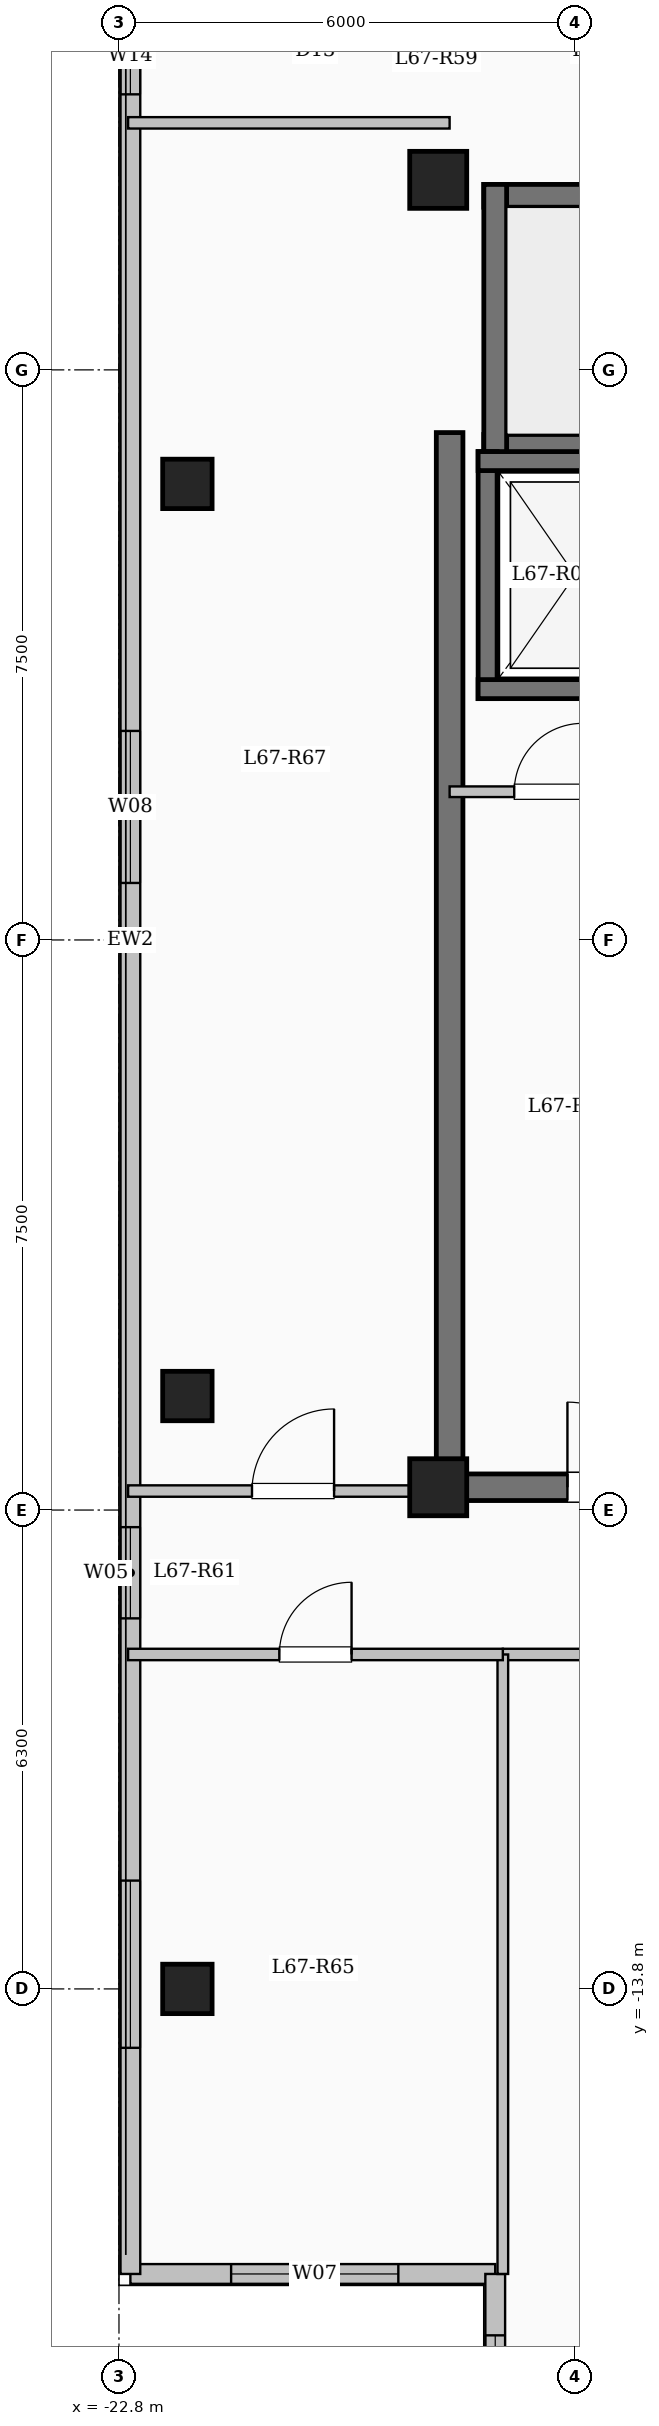
"""IFC4 building model, lengths in metres.
Left out: names, types, materials, properties, quantities, classifications, styles, units other than length and angle.
Written with IfcOpenShell. Run it as: python <this file> out.ifc"""

import sys

from ifc_helpers import new_model, si_unit, direction, frame, frame_2d, origin, origin_2d, place, context, subcontext, project, spatial, rectangle, extrude, element, fill, save


model = new_model("IFC4")
c1 = context("Model", 3, precision=1e-05, world=origin(), true_north=direction((0.0, 1.0)))
c2 = subcontext(c1, "Body", "Model", "MODEL_VIEW")
j1 = project(units=[si_unit("LENGTHUNIT", "METRE"), si_unit("PLANEANGLEUNIT", "RADIAN")], contexts=[c1])
p1 = place(None, origin())
s1 = spatial("IfcSite", under=j1, at=p1, CompositionType="ELEMENT")
p2 = place(p1, origin())
s2 = spatial("IfcBuilding", under=s1, at=p2, CompositionType="ELEMENT")
p3 = place(p2, frame((0.0, 0.0, 248.2)))
s3 = spatial("IfcBuildingStorey", under=s2, at=p3, CompositionType="ELEMENT", Elevation=248.2)
for number, where, z_axis, x_axis in (
    (1, (-18.6, -7.2, 0.0), (0.0, 0.0, 1.0), (1.0, 0.0, 0.0)),
    (2, (-18.6, 10.0, 0.0), (0.0, 0.0, 1.0), (1.0, 0.0, 0.0)),
):
    element("IfcColumn", number, at=place(p3, frame(where, z_axis=z_axis, x_axis=x_axis)), inside=s3, PredefinedType="COLUMN", context=c2, shape_type="SweptSolid", body=[
        extrude(rectangle(XDim=0.75, YDim=0.75, at=origin_2d()), origin(), (0.0, 0.0, 1.0), 3.35),
    ])
for number, where, z_axis, x_axis in (
    (3, (-21.9, -13.8, 0.0), (0.0, 0.0, 1.0), (1.0, 0.0, 0.0)),
    (4, (-21.9, -6.0, 0.0), (0.0, 0.0, 1.0), (1.0, 0.0, 0.0)),
    (5, (-21.9, 6.0, 0.0), (0.0, 0.0, 1.0), (1.0, 0.0, 0.0)),
):
    element("IfcColumn", number, at=place(p3, frame(where, z_axis=z_axis, x_axis=x_axis)), inside=s3, PredefinedType="COLUMN", context=c2, shape_type="SweptSolid", body=[
        extrude(rectangle(XDim=0.65, YDim=0.65, at=origin_2d()), origin(), (0.0, 0.0, 1.0), 3.35),
    ])
p4 = place(p3, frame((-17.85, -17.55, 0.0), z_axis=(0.0, 0.0, 1.0), x_axis=(-1.0, 0.0, 0.0)))
e6 = element("IfcWall", 6, at=p4, inside=s3, PredefinedType="SOLIDWALL", context=c2, shape_type="SweptSolid", body=[
    extrude(rectangle(XDim=4.8, YDim=0.26, at=frame_2d((2.4, 0.0))), origin(), (0.0, 0.0, 1.0), 3.1),
])
p5 = place(p4, frame((1.275, 0.0, 0.9)))
e7 = element("IfcOpeningElement", 7, at=p5, cuts=e6, PredefinedType="OPENING", context=c2, shape_type="SweptSolid", body=[
    extrude(rectangle(XDim=2.2, YDim=1.75, at=frame_2d((1.1, 0.875))), frame((0.0, 0.14, 0.0), z_axis=(0.0, -1.0, 0.0), x_axis=(1.0, 0.0, 0.0)), (0.0, 0.0, 1.0), 0.28),
])
p6 = place(p3, frame((-22.65, -17.55, 0.0), z_axis=(0.0, 0.0, 1.0), x_axis=(0.0, 1.0, 0.0)))
e8 = element("IfcWall", 8, at=p6, inside=s3, PredefinedType="SOLIDWALL", context=c2, shape_type="SweptSolid", body=[
    extrude(rectangle(XDim=35.1, YDim=0.26, at=frame_2d((17.55, 0.0))), origin(), (0.0, 0.0, 1.0), 3.1),
])
p7 = place(p6, frame((2.975, 0.0, 0.9)))
e9 = element("IfcOpeningElement", 9, at=p7, cuts=e8, PredefinedType="OPENING", context=c2, shape_type="SweptSolid", body=[
    extrude(rectangle(XDim=2.2, YDim=1.75, at=frame_2d((1.1, 0.875))), frame((0.0, 0.14, 0.0), z_axis=(0.0, -1.0, 0.0), x_axis=(1.0, 0.0, 0.0)), (0.0, 0.0, 1.0), 0.28),
])
p8 = place(p6, frame((8.625, 0.0, 0.95)))
e10 = element("IfcOpeningElement", 10, at=p8, cuts=e8, PredefinedType="OPENING", context=c2, shape_type="SweptSolid", body=[
    extrude(rectangle(XDim=1.2, YDim=1.5, at=frame_2d((0.6, 0.75))), frame((0.0, 0.14, 0.0), z_axis=(0.0, -1.0, 0.0), x_axis=(1.0, 0.0, 0.0)), (0.0, 0.0, 1.0), 0.28),
])
p9 = place(p6, frame((18.3, 0.0, 0.9)))
e11 = element("IfcOpeningElement", 11, at=p9, cuts=e8, PredefinedType="OPENING", context=c2, shape_type="SweptSolid", body=[
    extrude(rectangle(XDim=2.0, YDim=1.7, at=frame_2d((1.0, 0.85))), frame((0.0, 0.14, 0.0), z_axis=(0.0, -1.0, 0.0), x_axis=(1.0, 0.0, 0.0)), (0.0, 0.0, 1.0), 0.28),
])
p10 = place(p6, frame((28.675, 0.0, 0.95)))
e12 = element("IfcOpeningElement", 12, at=p10, cuts=e8, PredefinedType="OPENING", context=c2, shape_type="SweptSolid", body=[
    extrude(rectangle(XDim=1.0, YDim=1.5, at=frame_2d((0.5, 0.75))), frame((0.0, 0.14, 0.0), z_axis=(0.0, -1.0, 0.0), x_axis=(1.0, 0.0, 0.0)), (0.0, 0.0, 1.0), 0.28),
])
p11 = place(p6, frame((31.6, 0.0, 0.9)))
e13 = element("IfcOpeningElement", 13, at=p11, cuts=e8, PredefinedType="OPENING", context=c2, shape_type="SweptSolid", body=[
    extrude(rectangle(XDim=2.0, YDim=1.7, at=frame_2d((1.0, 0.85))), frame((0.0, 0.14, 0.0), z_axis=(0.0, -1.0, 0.0), x_axis=(1.0, 0.0, 0.0)), (0.0, 0.0, 1.0), 0.28),
])
p12 = place(p3, frame((-17.85, -20.85, 0.0), z_axis=(0.0, 0.0, 1.0), x_axis=(0.0, 1.0, 0.0)))
e14 = element("IfcWall", 14, at=p12, inside=s3, PredefinedType="SOLIDWALL", context=c2, shape_type="SweptSolid", body=[
    extrude(rectangle(XDim=3.3, YDim=0.26, at=frame_2d((1.65, 0.0))), origin(), (0.0, 0.0, 1.0), 3.1),
])
p13 = place(p12, frame((0.843, 0.0, 0.9)))
e15 = element("IfcOpeningElement", 15, at=p13, cuts=e14, PredefinedType="OPENING", context=c2, shape_type="SweptSolid", body=[
    extrude(rectangle(XDim=1.65, YDim=1.6, at=frame_2d((0.825, 0.8))), frame((0.0, 0.14, 0.0), z_axis=(0.0, -1.0, 0.0), x_axis=(1.0, 0.0, 0.0)), (0.0, 0.0, 1.0), 0.28),
])
p14 = place(p3, frame((-18.0, 9.79, 0.0), z_axis=(0.0, 0.0, 1.0), x_axis=(1.0, 0.0, 0.0)))
e16 = element("IfcWall", 16, at=p14, inside=s3, PredefinedType="SHEAR", context=c2, shape_type="SweptSolid", body=[
    extrude(rectangle(XDim=8.0, YDim=0.3, at=frame_2d((4.0, 0.0))), origin(), (0.0, 0.0, 1.0), 3.35),
])
p15 = place(p3, frame((-18.0, 6.5, 0.0), z_axis=(0.0, 0.0, 1.0), x_axis=(1.0, 0.0, 0.0)))
e17 = element("IfcWall", 17, at=p15, inside=s3, PredefinedType="SHEAR", context=c2, shape_type="SweptSolid", body=[
    extrude(rectangle(XDim=8.0, YDim=0.3, at=frame_2d((4.0, 0.0))), origin(), (0.0, 0.0, 1.0), 3.35),
])
p16 = place(p15, frame((6.45, 0.0, 0.0)))
e18 = element("IfcOpeningElement", 18, at=p16, cuts=e17, PredefinedType="OPENING", context=c2, shape_type="SweptSolid", body=[
    extrude(rectangle(XDim=1.0, YDim=2.15, at=frame_2d((0.5, 1.075))), frame((0.0, 0.16, 0.0), z_axis=(0.0, -1.0, 0.0), x_axis=(1.0, 0.0, 0.0)), (0.0, 0.0, 1.0), 0.32),
])
p17 = place(p3, frame((-17.85, 6.35, 0.0), z_axis=(0.0, 0.0, 1.0), x_axis=(0.0, 1.0, 0.0)))
e19 = element("IfcWall", 19, at=p17, inside=s3, PredefinedType="SHEAR", context=c2, shape_type="SweptSolid", body=[
    extrude(rectangle(XDim=3.59, YDim=0.3, at=frame_2d((1.795, 0.0))), origin(), (0.0, 0.0, 1.0), 3.35),
])
p18 = place(p3, frame((-17.95, 3.175, 0.0), z_axis=(0.0, 0.0, 1.0), x_axis=(0.0, 1.0, 0.0)))
e20 = element("IfcWall", 20, at=p18, inside=s3, PredefinedType="SHEAR", context=c2, shape_type="SweptSolid", body=[
    extrude(rectangle(XDim=3.25, YDim=0.25, at=frame_2d((1.625, 0.0))), origin(), (0.0, 0.0, 1.0), 3.35),
])
for number, where, z_axis, x_axis in (
    (21, (-18.075, 3.3, 0.0), (0.0, 0.0, 1.0), (1.0, 0.0, 0.0)),
    (22, (-18.075, 6.3, 0.0), (0.0, 0.0, 1.0), (1.0, 0.0, 0.0)),
):
    element("IfcWall", number, at=place(p3, frame(where, z_axis=z_axis, x_axis=x_axis)), inside=s3, PredefinedType="SHEAR", context=c2, shape_type="SweptSolid", body=[
        extrude(rectangle(XDim=2.55, YDim=0.25, at=frame_2d((1.275, 0.0))), origin(), (0.0, 0.0, 1.0), 3.35),
    ])
p19 = place(p3, frame((-18.45, -7.375, 0.0), z_axis=(0.0, 0.0, 1.0), x_axis=(0.0, 1.0, 0.0)))
e23 = element("IfcWall", 23, at=p19, inside=s3, PredefinedType="SHEAR", context=c2, shape_type="SweptSolid", body=[
    extrude(rectangle(XDim=14.05, YDim=0.35, at=frame_2d((7.025, 0.0))), origin(), (0.0, 0.0, 1.0), 3.35),
])
p20 = place(p3, frame((-18.625, -7.2, 0.0), z_axis=(0.0, 0.0, 1.0), x_axis=(1.0, 0.0, 0.0)))
e24 = element("IfcWall", 24, at=p20, inside=s3, PredefinedType="SHEAR", context=c2, shape_type="SweptSolid", body=[
    extrude(rectangle(XDim=8.55, YDim=0.35, at=frame_2d((4.275, 0.0))), origin(), (0.0, 0.0, 1.0), 3.35),
])
p21 = place(p20, frame((1.725, 0.0, 0.0)))
e25 = element("IfcOpeningElement", 25, at=p21, cuts=e24, PredefinedType="OPENING", context=c2, shape_type="SweptSolid", body=[
    extrude(rectangle(XDim=1.12, YDim=2.15, at=frame_2d((0.56, 1.075))), frame((0.0, 0.185, 0.0), z_axis=(0.0, -1.0, 0.0), x_axis=(1.0, 0.0, 0.0)), (0.0, 0.0, 1.0), 0.37),
])
p22 = place(p3, frame((-18.45, 1.95, 0.0), z_axis=(0.0, 0.0, 1.0), x_axis=(1.0, 0.0, 0.0)))
e26 = element("IfcWall", 26, at=p22, inside=s3, PredefinedType="PARTITIONING", context=c2, shape_type="SweptSolid", body=[
    extrude(rectangle(XDim=3.15, YDim=0.14, at=frame_2d((1.575, 0.0))), origin(), (0.0, 0.0, 1.0), 3.1),
])
p23 = place(p22, frame((0.85, 0.0, 0.0)))
e27 = element("IfcOpeningElement", 27, at=p23, cuts=e26, PredefinedType="OPENING", context=c2, shape_type="SweptSolid", body=[
    extrude(rectangle(XDim=0.9, YDim=2.08, at=frame_2d((0.45, 1.04))), frame((0.0, 0.08, 0.0), z_axis=(0.0, -1.0, 0.0), x_axis=(1.0, 0.0, 0.0)), (0.0, 0.0, 1.0), 0.16),
])
p24 = place(p3, frame((-17.75, -9.4, 0.0), z_axis=(0.0, 0.0, 1.0), x_axis=(1.0, 0.0, 0.0)))
e28 = element("IfcWall", 28, at=p24, inside=s3, PredefinedType="PARTITIONING", context=c2, shape_type="SweptSolid", body=[
    extrude(rectangle(XDim=9.2, YDim=0.15, at=frame_2d((4.6, 0.0))), origin(), (0.0, 0.0, 1.0), 3.1),
])
p25 = place(p24, frame((1.142, 0.0, 0.0)))
e29 = element("IfcOpeningElement", 29, at=p25, cuts=e28, PredefinedType="OPENING", context=c2, shape_type="SweptSolid", body=[
    extrude(rectangle(XDim=0.95, YDim=2.15, at=frame_2d((0.475, 1.075))), frame((0.0, 0.085, 0.0), z_axis=(0.0, -1.0, 0.0), x_axis=(1.0, 0.0, 0.0)), (0.0, 0.0, 1.0), 0.17),
])
p26 = place(p24, frame((4.466, 0.0, 0.0)))
e30 = element("IfcOpeningElement", 30, at=p26, cuts=e28, PredefinedType="OPENING", context=c2, shape_type="SweptSolid", body=[
    extrude(rectangle(XDim=0.95, YDim=2.15, at=frame_2d((0.475, 1.075))), frame((0.0, 0.085, 0.0), z_axis=(0.0, -1.0, 0.0), x_axis=(1.0, 0.0, 0.0)), (0.0, 0.0, 1.0), 0.17),
])
p27 = place(p24, frame((7.424, 0.0, 0.0)))
e31 = element("IfcOpeningElement", 31, at=p27, cuts=e28, PredefinedType="OPENING", context=c2, shape_type="SweptSolid", body=[
    extrude(rectangle(XDim=0.95, YDim=2.15, at=frame_2d((0.475, 1.075))), frame((0.0, 0.085, 0.0), z_axis=(0.0, -1.0, 0.0), x_axis=(1.0, 0.0, 0.0)), (0.0, 0.0, 1.0), 0.17),
])
p28 = place(p3, frame((-22.68, -7.25, 0.0), z_axis=(0.0, 0.0, 1.0), x_axis=(1.0, 0.0, 0.0)))
e32 = element("IfcWall", 32, at=p28, inside=s3, PredefinedType="PARTITIONING", context=c2, shape_type="SweptSolid", body=[
    extrude(rectangle(XDim=4.23, YDim=0.15, at=frame_2d((2.115, 0.0))), origin(), (0.0, 0.0, 1.0), 3.1),
])
p29 = place(p28, frame((1.63, 0.0, 0.0)))
e33 = element("IfcOpeningElement", 33, at=p29, cuts=e32, PredefinedType="OPENING", context=c2, shape_type="SweptSolid", body=[
    extrude(rectangle(XDim=1.08, YDim=2.15, at=frame_2d((0.54, 1.075))), frame((0.0, 0.085, 0.0), z_axis=(0.0, -1.0, 0.0), x_axis=(1.0, 0.0, 0.0)), (0.0, 0.0, 1.0), 0.17),
])
p30 = place(p3, frame((-22.68, 10.75, 0.0), z_axis=(0.0, 0.0, 1.0), x_axis=(1.0, 0.0, 0.0)))
e34 = element("IfcWall", 34, at=p30, inside=s3, PredefinedType="PARTITIONING", context=c2, shape_type="SweptSolid", body=[
    extrude(rectangle(XDim=4.23, YDim=0.15, at=frame_2d((2.115, 0.0))), origin(), (0.0, 0.0, 1.0), 3.1),
])
p31 = place(p3, frame((-17.75, -17.55, 0.0), z_axis=(0.0, 0.0, 1.0), x_axis=(0.0, 1.0, 0.0)))
e35 = element("IfcWall", 35, at=p31, inside=s3, PredefinedType="PARTITIONING", context=c2, shape_type="SweptSolid", body=[
    extrude(rectangle(XDim=8.15, YDim=0.14, at=frame_2d((4.075, 0.0))), origin(), (0.0, 0.0, 1.0), 3.1),
])
p32 = place(p3, frame((-22.68, -9.4, 0.0), z_axis=(0.0, 0.0, 1.0), x_axis=(1.0, 0.0, 0.0)))
e36 = element("IfcWall", 36, at=p32, inside=s3, PredefinedType="PARTITIONING", context=c2, shape_type="SweptSolid", body=[
    extrude(rectangle(XDim=4.93, YDim=0.15, at=frame_2d((2.465, 0.0))), origin(), (0.0, 0.0, 1.0), 3.1),
])
p33 = place(p32, frame((1.99, 0.0, 0.0)))
e37 = element("IfcOpeningElement", 37, at=p33, cuts=e36, PredefinedType="OPENING", context=c2, shape_type="SweptSolid", body=[
    extrude(rectangle(XDim=0.95, YDim=2.15, at=frame_2d((0.475, 1.075))), frame((0.0, 0.085, 0.0), z_axis=(0.0, -1.0, 0.0), x_axis=(1.0, 0.0, 0.0)), (0.0, 0.0, 1.0), 0.17),
])
p34 = place(p5, origin())
e38 = element("IfcWindow", 38, at=p34, inside=s3, PartitioningType="SINGLE_PANEL", PredefinedType="WINDOW", context=c2, shape_type="SweptSolid", body=[
    extrude(rectangle(XDim=2.2, YDim=1.75, at=frame_2d((1.1, 0.875))), frame((0.0, 0.03, 0.0), z_axis=(0.0, -1.0, 0.0), x_axis=(1.0, 0.0, 0.0)), (0.0, 0.0, 1.0), 0.06),
])
fill(e7, e38)
p35 = place(p7, origin())
e39 = element("IfcWindow", 39, at=p35, inside=s3, PartitioningType="SINGLE_PANEL", PredefinedType="WINDOW", context=c2, shape_type="SweptSolid", body=[
    extrude(rectangle(XDim=2.2, YDim=1.75, at=frame_2d((1.1, 0.875))), frame((0.0, 0.03, 0.0), z_axis=(0.0, -1.0, 0.0), x_axis=(1.0, 0.0, 0.0)), (0.0, 0.0, 1.0), 0.06),
])
fill(e9, e39)
p36 = place(p8, origin())
e40 = element("IfcWindow", 40, at=p36, inside=s3, PartitioningType="SINGLE_PANEL", PredefinedType="WINDOW", context=c2, shape_type="SweptSolid", body=[
    extrude(rectangle(XDim=1.2, YDim=1.5, at=frame_2d((0.6, 0.75))), frame((0.0, 0.03, 0.0), z_axis=(0.0, -1.0, 0.0), x_axis=(1.0, 0.0, 0.0)), (0.0, 0.0, 1.0), 0.06),
])
fill(e10, e40)
p37 = place(p9, origin())
e41 = element("IfcWindow", 41, at=p37, inside=s3, PartitioningType="SINGLE_PANEL", PredefinedType="WINDOW", context=c2, shape_type="SweptSolid", body=[
    extrude(rectangle(XDim=2.0, YDim=1.7, at=frame_2d((1.0, 0.85))), frame((0.0, 0.03, 0.0), z_axis=(0.0, -1.0, 0.0), x_axis=(1.0, 0.0, 0.0)), (0.0, 0.0, 1.0), 0.06),
])
fill(e11, e41)
p38 = place(p10, origin())
e42 = element("IfcWindow", 42, at=p38, inside=s3, PartitioningType="SINGLE_PANEL", PredefinedType="WINDOW", context=c2, shape_type="SweptSolid", body=[
    extrude(rectangle(XDim=1.0, YDim=1.5, at=frame_2d((0.5, 0.75))), frame((0.0, 0.03, 0.0), z_axis=(0.0, -1.0, 0.0), x_axis=(1.0, 0.0, 0.0)), (0.0, 0.0, 1.0), 0.06),
])
fill(e12, e42)
p39 = place(p13, origin())
e43 = element("IfcWindow", 43, at=p39, inside=s3, PartitioningType="SINGLE_PANEL", PredefinedType="WINDOW", context=c2, shape_type="SweptSolid", body=[
    extrude(rectangle(XDim=1.65, YDim=1.6, at=frame_2d((0.825, 0.8))), frame((0.0, 0.03, 0.0), z_axis=(0.0, -1.0, 0.0), x_axis=(1.0, 0.0, 0.0)), (0.0, 0.0, 1.0), 0.06),
])
fill(e15, e43)
p40 = place(p21, origin())
e44 = element("IfcDoor", 44, at=p40, inside=s3, OperationType="SINGLE_SWING_LEFT", PredefinedType="DOOR", context=c2, shape_type="SweptSolid", body=[
    extrude(rectangle(XDim=1.12, YDim=2.15, at=frame_2d((0.56, 1.075))), frame((0.0, 0.025, 0.0), z_axis=(0.0, -1.0, 0.0), x_axis=(1.0, 0.0, 0.0)), (0.0, 0.0, 1.0), 0.05),
])
fill(e25, e44)
p41 = place(p23, origin())
e45 = element("IfcDoor", 45, at=p41, inside=s3, OperationType="SINGLE_SWING_RIGHT", PredefinedType="DOOR", context=c2, shape_type="SweptSolid", body=[
    extrude(rectangle(XDim=0.9, YDim=2.08, at=frame_2d((0.45, 1.04))), frame((0.0, 0.025, 0.0), z_axis=(0.0, -1.0, 0.0), x_axis=(1.0, 0.0, 0.0)), (0.0, 0.0, 1.0), 0.05),
])
fill(e27, e45)
p42 = place(p33, origin())
e46 = element("IfcDoor", 46, at=p42, inside=s3, OperationType="SINGLE_SWING_RIGHT", PredefinedType="DOOR", context=c2, shape_type="SweptSolid", body=[
    extrude(rectangle(XDim=0.95, YDim=2.15, at=frame_2d((0.475, 1.075))), frame((0.0, 0.025, 0.0), z_axis=(0.0, -1.0, 0.0), x_axis=(1.0, 0.0, 0.0)), (0.0, 0.0, 1.0), 0.05),
])
fill(e37, e46)
p43 = place(p29, origin())
e47 = element("IfcDoor", 47, at=p43, inside=s3, OperationType="SINGLE_SWING_RIGHT", PredefinedType="DOOR", context=c2, shape_type="SweptSolid", body=[
    extrude(rectangle(XDim=1.08, YDim=2.15, at=frame_2d((0.54, 1.075))), frame((0.0, 0.025, 0.0), z_axis=(0.0, -1.0, 0.0), x_axis=(1.0, 0.0, 0.0)), (0.0, 0.0, 1.0), 0.05),
])
fill(e33, e47)
save(model, sys.argv[1])
